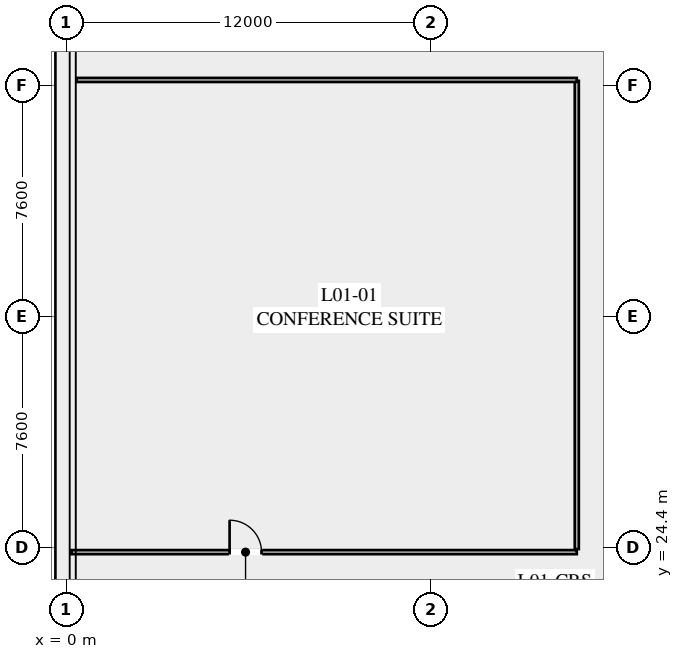
"""IFC4 building model, lengths in metres.
Left out: names, types, materials, properties, quantities, classifications, styles, units other than length and angle.
Written with IfcOpenShell. Run it as: python <this file> out.ifc"""

import sys

from ifc_helpers import new_model, si_unit, direction, frame, frame_2d, origin, place, context, subcontext, project, spatial, rectangle, extrude, element, fill, save


model = new_model("IFC4")
c1 = context("Model", 3, precision=1e-05, world=origin(), true_north=direction((0.0, 1.0)))
c2 = subcontext(c1, "Body", "Model", "MODEL_VIEW")
j1 = project(units=[si_unit("LENGTHUNIT", "METRE"), si_unit("PLANEANGLEUNIT", "RADIAN")], contexts=[c1])
p1 = place(None, origin())
s1 = spatial("IfcSite", under=j1, at=p1, CompositionType="ELEMENT")
p2 = place(p1, origin())
s2 = spatial("IfcBuilding", under=s1, at=p2, CompositionType="ELEMENT")
p3 = place(p2, frame((0.0, 0.0, 5.4)))
s3 = spatial("IfcBuildingStorey", under=s2, at=p3, CompositionType="ELEMENT", Elevation=5.4)
p4 = place(p3, frame((0.18, 24.25, 0.0), z_axis=(0.0, 0.0, 1.0), x_axis=(1.0, 0.0, 0.0)))
e1 = element("IfcWall", 1, at=p4, inside=s3, PredefinedType="PARTITIONING", context=c2, shape_type="SweptSolid", body=[
    extrude(rectangle(XDim=16.62, YDim=0.135, at=frame_2d((8.31, 0.0))), origin(), (0.0, 0.0, 1.0), 3.583),
])
p5 = place(p4, frame((5.2, 0.0, 0.0)))
e2 = element("IfcOpeningElement", 2, at=p5, cuts=e1, PredefinedType="OPENING", context=c2, shape_type="SweptSolid", body=[
    extrude(rectangle(XDim=1.05, YDim=2.2, at=frame_2d((0.525, 1.1))), frame((0.0, 0.077, 0.0), z_axis=(0.0, -1.0, 0.0), x_axis=(1.0, 0.0, 0.0)), (0.0, 0.0, 1.0), 0.155),
])
p6 = place(p3, frame((16.8, 24.35, 0.0), z_axis=(0.0, 0.0, 1.0), x_axis=(0.0, 1.0, 0.0)))
e3 = element("IfcWall", 3, at=p6, inside=s3, PredefinedType="PARTITIONING", context=c2, shape_type="SweptSolid", body=[
    extrude(rectangle(XDim=15.4, YDim=0.135, at=frame_2d((7.7, 0.0))), origin(), (0.0, 0.0, 1.0), 3.583),
])
p7 = place(p3, frame((0.35, 39.78, 0.0), z_axis=(0.0, 0.0, 1.0), x_axis=(1.0, 0.0, 0.0)))
e4 = element("IfcWall", 4, at=p7, inside=s3, PredefinedType="PARTITIONING", context=c2, shape_type="SweptSolid", body=[
    extrude(rectangle(XDim=16.45, YDim=0.135, at=frame_2d((8.225, 0.0))), origin(), (0.0, 0.0, 1.0), 3.583),
])
p8 = place(p5, origin())
e5 = element("IfcDoor", 5, at=p8, inside=s3, OperationType="SINGLE_SWING_LEFT", PredefinedType="DOOR", context=c2, shape_type="SweptSolid", body=[
    extrude(rectangle(XDim=1.05, YDim=2.2, at=frame_2d((0.525, 1.1))), frame((0.0, 0.025, 0.0), z_axis=(0.0, -1.0, 0.0), x_axis=(1.0, 0.0, 0.0)), (0.0, 0.0, 1.0), 0.05),
])
fill(e2, e5)
save(model, sys.argv[1])
